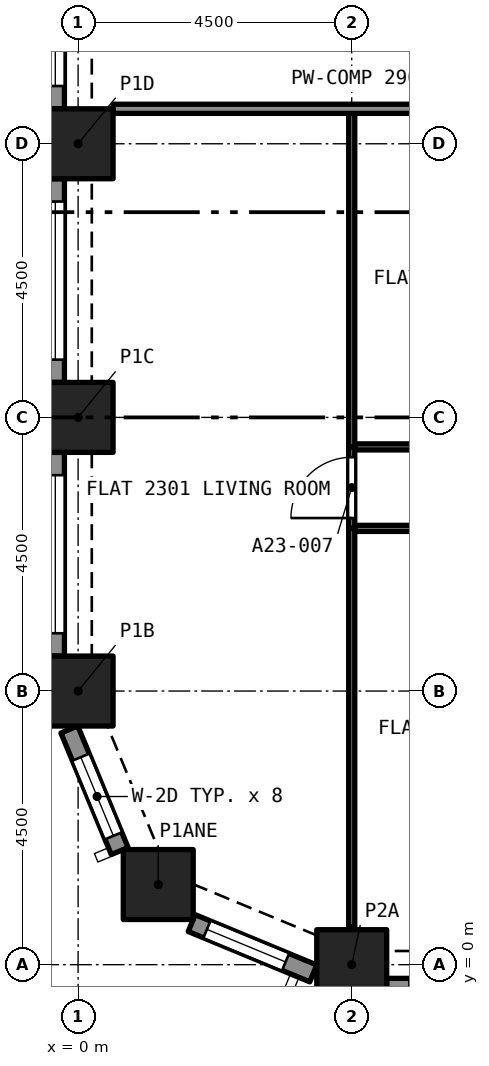
"""IFC4 building model, lengths in metres.
Left out: names, types, materials, properties, quantities, classifications, styles, units other than length and angle.
Written with IfcOpenShell. Run it as: python <this file> out.ifc"""

import sys

from ifc_helpers import new_model, si_unit, direction, frame, frame_2d, origin, origin_2d, place, context, subcontext, project, spatial, rectangle, extrude, element, fill, save


model = new_model("IFC4")
c1 = context("Model", 3, precision=1e-05, world=origin(), true_north=direction((0.0, 1.0)))
c2 = subcontext(c1, "Body", "Model", "MODEL_VIEW")
j1 = project(units=[si_unit("LENGTHUNIT", "METRE"), si_unit("PLANEANGLEUNIT", "RADIAN")], contexts=[c1])
p1 = place(None, origin())
s1 = spatial("IfcSite", under=j1, at=p1, CompositionType="ELEMENT")
p2 = place(p1, origin())
s2 = spatial("IfcBuilding", under=s1, at=p2, CompositionType="ELEMENT")
p3 = place(p2, frame((0.0, 0.0, 86.4)))
s3 = spatial("IfcBuildingStorey", under=s2, at=p3, CompositionType="ELEMENT", Elevation=86.4)
for number, where, z_axis, x_axis in (
    (1, (4.5, 0.0, 0.0), (0.0, 0.0, 1.0), (1.0, 0.0, 0.0)),
    (2, (1.318, 1.318, 0.0), (0.0, 0.0, 1.0), (1.0, 0.0, 0.0)),
    (3, (0.0, 4.5, 0.0), (0.0, 0.0, 1.0), (1.0, 0.0, 0.0)),
    (4, (0.0, 9.0, 0.0), (0.0, 0.0, 1.0), (1.0, 0.0, 0.0)),
    (5, (0.0, 13.5, 0.0), (0.0, 0.0, 1.0), (1.0, 0.0, 0.0)),
):
    element("IfcColumn", number, at=place(p3, frame(where, z_axis=z_axis, x_axis=x_axis)), inside=s3, PredefinedType="COLUMN", context=c2, shape_type="SweptSolid", body=[
        extrude(rectangle(XDim=1.15, YDim=1.15, at=origin_2d()), origin(), (0.0, 0.0, 1.0), 3.2),
    ])
p4 = place(p3, frame((0.684, 1.869, 0.0), z_axis=(0.0, 0.0, 1.0), x_axis=(-0.382723818695, 0.923862802911, 0.0)))
e6 = element("IfcWall", 6, at=p4, inside=s3, PredefinedType="SOLIDWALL", context=c2, shape_type="SweptSolid", body=[
    extrude(rectangle(XDim=2.164, YDim=0.3, at=frame_2d((1.082, 0.0))), origin(), (0.0, 0.0, 1.0), 3.2),
])
p5 = place(p4, frame((0.271, 0.0, 0.45)))
e7 = element("IfcOpeningElement", 7, at=p5, cuts=e6, PredefinedType="OPENING", context=c2, shape_type="SweptSolid", body=[
    extrude(rectangle(XDim=1.4, YDim=1.95, at=frame_2d((0.7, 0.975))), frame((0.0, 0.16, 0.0), z_axis=(0.0, -1.0, 0.0), x_axis=(1.0, 0.0, 0.0)), (0.0, 0.0, 1.0), 0.32),
])
p6 = place(p3, frame((3.868, -0.144, 0.0), z_axis=(0.0, 0.0, 1.0), x_axis=(-0.923862802911, 0.382723818695, 0.0)))
e8 = element("IfcWall", 8, at=p6, inside=s3, PredefinedType="SOLIDWALL", context=c2, shape_type="SweptSolid", body=[
    extrude(rectangle(XDim=2.164, YDim=0.3, at=frame_2d((1.082, 0.0))), origin(), (0.0, 0.0, 1.0), 3.2),
])
p7 = place(p6, frame((0.493, 0.0, 0.45)))
e9 = element("IfcOpeningElement", 9, at=p7, cuts=e8, PredefinedType="OPENING", context=c2, shape_type="SweptSolid", body=[
    extrude(rectangle(XDim=1.4, YDim=1.95, at=frame_2d((0.7, 0.975))), frame((0.0, 0.16, 0.0), z_axis=(0.0, -1.0, 0.0), x_axis=(1.0, 0.0, 0.0)), (0.0, 0.0, 1.0), 0.32),
])
p8 = place(p3, frame((8.425, -0.375, 0.0), z_axis=(0.0, 0.0, 1.0), x_axis=(-1.0, 0.0, 0.0)))
e10 = element("IfcWall", 10, at=p8, inside=s3, PredefinedType="SOLIDWALL", context=c2, shape_type="SweptSolid", body=[
    extrude(rectangle(XDim=3.35, YDim=0.3, at=frame_2d((1.675, 0.0))), origin(), (0.0, 0.0, 1.0), 3.2),
])
p9 = place(p8, frame((0.375, 0.0, 0.45)))
e11 = element("IfcOpeningElement", 11, at=p9, cuts=e10, PredefinedType="OPENING", context=c2, shape_type="SweptSolid", body=[
    extrude(rectangle(XDim=2.6, YDim=1.95, at=frame_2d((1.3, 0.975))), frame((0.0, 0.16, 0.0), z_axis=(0.0, -1.0, 0.0), x_axis=(1.0, 0.0, 0.0)), (0.0, 0.0, 1.0), 0.32),
])
p10 = place(p3, frame((-0.375, 14.075, 0.0), z_axis=(0.0, 0.0, 1.0), x_axis=(0.0, 1.0, 0.0)))
e12 = element("IfcWall", 12, at=p10, inside=s3, PredefinedType="SOLIDWALL", context=c2, shape_type="SweptSolid", body=[
    extrude(rectangle(XDim=3.35, YDim=0.3, at=frame_2d((1.675, 0.0))), origin(), (0.0, 0.0, 1.0), 3.2),
])
p11 = place(p10, frame((0.375, 0.0, 0.45)))
e13 = element("IfcOpeningElement", 13, at=p11, cuts=e12, PredefinedType="OPENING", context=c2, shape_type="SweptSolid", body=[
    extrude(rectangle(XDim=2.6, YDim=1.95, at=frame_2d((1.3, 0.975))), frame((0.0, 0.16, 0.0), z_axis=(0.0, -1.0, 0.0), x_axis=(1.0, 0.0, 0.0)), (0.0, 0.0, 1.0), 0.32),
])
p12 = place(p3, frame((-0.375, 9.575, 0.0), z_axis=(0.0, 0.0, 1.0), x_axis=(0.0, 1.0, 0.0)))
e14 = element("IfcWall", 14, at=p12, inside=s3, PredefinedType="SOLIDWALL", context=c2, shape_type="SweptSolid", body=[
    extrude(rectangle(XDim=3.35, YDim=0.3, at=frame_2d((1.675, 0.0))), origin(), (0.0, 0.0, 1.0), 3.2),
])
p13 = place(p12, frame((0.375, 0.0, 0.45)))
e15 = element("IfcOpeningElement", 15, at=p13, cuts=e14, PredefinedType="OPENING", context=c2, shape_type="SweptSolid", body=[
    extrude(rectangle(XDim=2.6, YDim=1.95, at=frame_2d((1.3, 0.975))), frame((0.0, 0.16, 0.0), z_axis=(0.0, -1.0, 0.0), x_axis=(1.0, 0.0, 0.0)), (0.0, 0.0, 1.0), 0.32),
])
p14 = place(p3, frame((-0.375, 5.075, 0.0), z_axis=(0.0, 0.0, 1.0), x_axis=(0.0, 1.0, 0.0)))
e16 = element("IfcWall", 16, at=p14, inside=s3, PredefinedType="SOLIDWALL", context=c2, shape_type="SweptSolid", body=[
    extrude(rectangle(XDim=3.35, YDim=0.3, at=frame_2d((1.675, 0.0))), origin(), (0.0, 0.0, 1.0), 3.2),
])
p15 = place(p14, frame((0.375, 0.0, 0.45)))
e17 = element("IfcOpeningElement", 17, at=p15, cuts=e16, PredefinedType="OPENING", context=c2, shape_type="SweptSolid", body=[
    extrude(rectangle(XDim=2.6, YDim=1.95, at=frame_2d((1.3, 0.975))), frame((0.0, 0.16, 0.0), z_axis=(0.0, -1.0, 0.0), x_axis=(1.0, 0.0, 0.0)), (0.0, 0.0, 1.0), 0.32),
])
p16 = place(p3, frame((9.0, 7.175, 0.0), z_axis=(0.0, 0.0, 1.0), x_axis=(-1.0, 0.0, 0.0)))
e18 = element("IfcWall", 18, at=p16, inside=s3, PredefinedType="PARTITIONING", context=c2, shape_type="SweptSolid", body=[
    extrude(rectangle(XDim=4.45, YDim=0.1, at=frame_2d((2.225, 0.0))), origin(), (0.0, 0.0, 1.0), 2.9),
])
p17 = place(p16, frame((1.8, 0.0, 0.0)))
e19 = element("IfcOpeningElement", 19, at=p17, cuts=e18, PredefinedType="OPENING", context=c2, shape_type="SweptSolid", body=[
    extrude(rectangle(XDim=0.9, YDim=2.1, at=frame_2d((0.45, 1.05))), frame((0.0, 0.06, 0.0), z_axis=(0.0, -1.0, 0.0), x_axis=(1.0, 0.0, 0.0)), (0.0, 0.0, 1.0), 0.12),
])
p18 = place(p3, frame((4.5, 0.622, 0.0), z_axis=(0.0, 0.0, 1.0), x_axis=(0.0, 1.0, 0.0)))
e20 = element("IfcWall", 20, at=p18, inside=s3, PredefinedType="PARTITIONING", context=c2, shape_type="SweptSolid", body=[
    extrude(rectangle(XDim=6.553, YDim=0.1, at=frame_2d((3.276, 0.0))), origin(), (0.0, 0.0, 1.0), 2.9),
])
p19 = place(p3, frame((4.55, 8.515, 0.0), z_axis=(0.0, 0.0, 1.0), x_axis=(1.0, 0.0, 0.0)))
e21 = element("IfcWall", 21, at=p19, inside=s3, PredefinedType="PARTITIONING", context=c2, shape_type="SweptSolid", body=[
    extrude(rectangle(XDim=3.913, YDim=0.1, at=frame_2d((1.957, 0.0))), origin(), (0.0, 0.0, 1.0), 2.9),
])
p20 = place(p19, frame((1.482, 0.0, 0.0)))
e22 = element("IfcOpeningElement", 22, at=p20, cuts=e21, PredefinedType="OPENING", context=c2, shape_type="SweptSolid", body=[
    extrude(rectangle(XDim=0.9, YDim=2.1, at=frame_2d((0.45, 1.05))), frame((0.0, 0.06, 0.0), z_axis=(0.0, -1.0, 0.0), x_axis=(1.0, 0.0, 0.0)), (0.0, 0.0, 1.0), 0.12),
])
p21 = place(p3, frame((4.5, 7.175, 0.0), z_axis=(0.0, 0.0, 1.0), x_axis=(0.0, 1.0, 0.0)))
e23 = element("IfcWall", 23, at=p21, inside=s3, PredefinedType="PARTITIONING", context=c2, shape_type="SweptSolid", body=[
    extrude(rectangle(XDim=1.34, YDim=0.1, at=frame_2d((0.67, 0.0))), origin(), (0.0, 0.0, 1.0), 2.9),
])
p22 = place(p21, frame((0.17, 0.0, 0.0)))
e24 = element("IfcOpeningElement", 24, at=p22, cuts=e23, PredefinedType="OPENING", context=c2, shape_type="SweptSolid", body=[
    extrude(rectangle(XDim=1.0, YDim=2.1, at=frame_2d((0.5, 1.05))), frame((0.0, 0.06, 0.0), z_axis=(0.0, -1.0, 0.0), x_axis=(1.0, 0.0, 0.0)), (0.0, 0.0, 1.0), 0.12),
])
p23 = place(p3, frame((4.5, 8.515, 0.0), z_axis=(0.0, 0.0, 1.0), x_axis=(0.0, 1.0, 0.0)))
e25 = element("IfcWall", 25, at=p23, inside=s3, PredefinedType="PARTITIONING", context=c2, shape_type="SweptSolid", body=[
    extrude(rectangle(XDim=5.485, YDim=0.1, at=frame_2d((2.743, 0.0))), origin(), (0.0, 0.0, 1.0), 2.9),
])
p24 = place(p3, frame((0.575, 14.075, 0.0), z_axis=(0.0, 0.0, 1.0), x_axis=(1.0, 0.0, 0.0)))
e26 = element("IfcWall", 26, at=p24, inside=s3, PredefinedType="PARTITIONING", context=c2, shape_type="SweptSolid", body=[
    extrude(rectangle(XDim=10.075, YDim=0.15, at=frame_2d((5.038, 0.0))), origin(), (0.0, 0.0, 1.0), 2.9),
])
p25 = place(p5, origin())
e27 = element("IfcWindow", 27, at=p25, inside=s3, PartitioningType="SINGLE_PANEL", PredefinedType="WINDOW", context=c2, shape_type="SweptSolid", body=[
    extrude(rectangle(XDim=1.4, YDim=1.95, at=frame_2d((0.7, 0.975))), frame((0.0, 0.03, 0.0), z_axis=(0.0, -1.0, 0.0), x_axis=(1.0, 0.0, 0.0)), (0.0, 0.0, 1.0), 0.06),
])
fill(e7, e27)
p26 = place(p7, origin())
e28 = element("IfcWindow", 28, at=p26, inside=s3, PartitioningType="SINGLE_PANEL", PredefinedType="WINDOW", context=c2, shape_type="SweptSolid", body=[
    extrude(rectangle(XDim=1.4, YDim=1.95, at=frame_2d((0.7, 0.975))), frame((0.0, 0.03, 0.0), z_axis=(0.0, -1.0, 0.0), x_axis=(1.0, 0.0, 0.0)), (0.0, 0.0, 1.0), 0.06),
])
fill(e9, e28)
p27 = place(p11, origin())
e29 = element("IfcWindow", 29, at=p27, inside=s3, PartitioningType="SINGLE_PANEL", PredefinedType="WINDOW", context=c2, shape_type="SweptSolid", body=[
    extrude(rectangle(XDim=2.6, YDim=1.95, at=frame_2d((1.3, 0.975))), frame((0.0, 0.03, 0.0), z_axis=(0.0, -1.0, 0.0), x_axis=(1.0, 0.0, 0.0)), (0.0, 0.0, 1.0), 0.06),
])
fill(e13, e29)
p28 = place(p13, origin())
e30 = element("IfcWindow", 30, at=p28, inside=s3, PartitioningType="SINGLE_PANEL", PredefinedType="WINDOW", context=c2, shape_type="SweptSolid", body=[
    extrude(rectangle(XDim=2.6, YDim=1.95, at=frame_2d((1.3, 0.975))), frame((0.0, 0.03, 0.0), z_axis=(0.0, -1.0, 0.0), x_axis=(1.0, 0.0, 0.0)), (0.0, 0.0, 1.0), 0.06),
])
fill(e15, e30)
p29 = place(p15, origin())
e31 = element("IfcWindow", 31, at=p29, inside=s3, PartitioningType="SINGLE_PANEL", PredefinedType="WINDOW", context=c2, shape_type="SweptSolid", body=[
    extrude(rectangle(XDim=2.6, YDim=1.95, at=frame_2d((1.3, 0.975))), frame((0.0, 0.03, 0.0), z_axis=(0.0, -1.0, 0.0), x_axis=(1.0, 0.0, 0.0)), (0.0, 0.0, 1.0), 0.06),
])
fill(e17, e31)
p30 = place(p22, origin())
e32 = element("IfcDoor", 32, at=p30, inside=s3, OperationType="SINGLE_SWING_LEFT", PredefinedType="DOOR", context=c2, shape_type="SweptSolid", body=[
    extrude(rectangle(XDim=1.0, YDim=2.1, at=frame_2d((0.5, 1.05))), frame((0.0, 0.025, 0.0), z_axis=(0.0, -1.0, 0.0), x_axis=(1.0, 0.0, 0.0)), (0.0, 0.0, 1.0), 0.05),
])
fill(e24, e32)
save(model, sys.argv[1])
